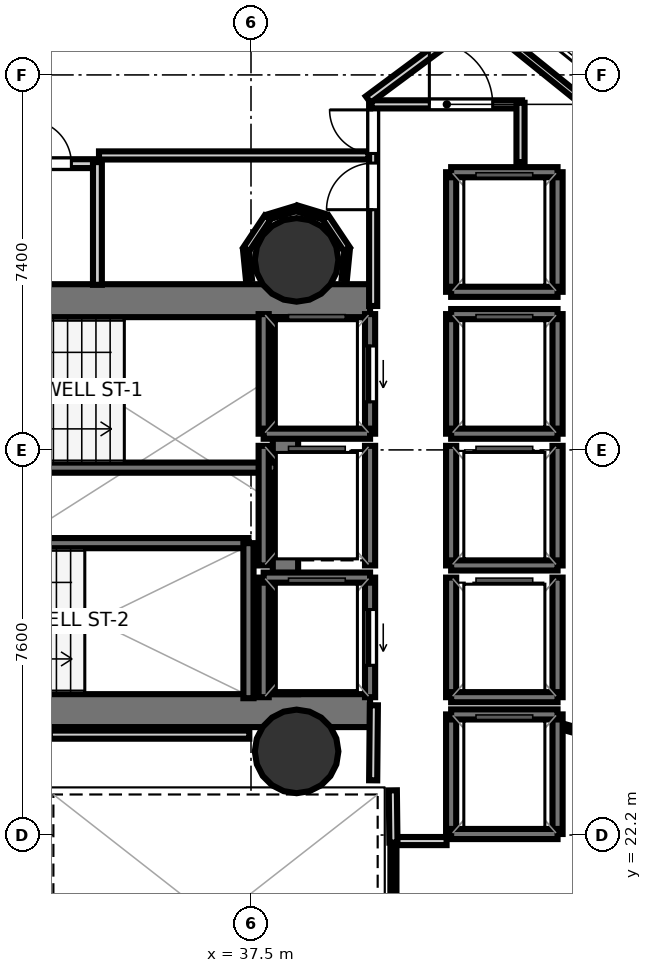
"""IFC4 building model, lengths in metres.
Left out: names, types, materials, properties, quantities, classifications, styles, units other than length and angle.
Written with IfcOpenShell. Run it as: python <this file> out.ifc"""

import sys

from ifc_helpers import new_model, si_unit, direction, frame, frame_2d, origin, origin_2d, place, context, subcontext, project, spatial, rectangle, hollow_circle, extrude, element, fill, save


model = new_model("IFC4")
c1 = context("Model", 3, precision=1e-05, world=origin(), true_north=direction((0.0, 1.0)))
c2 = subcontext(c1, "Body", "Model", "MODEL_VIEW")
j1 = project(units=[si_unit("LENGTHUNIT", "METRE"), si_unit("PLANEANGLEUNIT", "RADIAN")], contexts=[c1])
p1 = place(None, origin())
s1 = spatial("IfcSite", under=j1, at=p1, CompositionType="ELEMENT")
p2 = place(p1, origin())
s2 = spatial("IfcBuilding", under=s1, at=p2, CompositionType="ELEMENT")
p3 = place(p2, frame((0.0, 0.0, 82.1)))
s3 = spatial("IfcBuildingStorey", under=s2, at=p3, CompositionType="ELEMENT", Elevation=82.1)
p4 = place(p3, frame((29.13, 32.745, 0.0), z_axis=(0.0, 0.0, 1.0), x_axis=(1.0, 0.0, 0.0)))
e1 = element("IfcWall", 1, at=p4, inside=s3, PredefinedType="SHEAR", context=c2, shape_type="SweptSolid", body=[
    extrude(rectangle(XDim=10.72, YDim=0.65, at=frame_2d((5.36, 0.0))), origin(), (0.0, 0.0, 1.0), 3.52),
])
p5 = place(p4, frame((1.095, 0.0, 0.0)))
e2 = element("IfcOpeningElement", 2, at=p5, cuts=e1, PredefinedType="OPENING", context=c2, shape_type="SweptSolid", body=[
    extrude(rectangle(XDim=1.25, YDim=2.15, at=frame_2d((0.625, 1.075))), frame((0.0, 0.335, 0.0), z_axis=(0.0, -1.0, 0.0), x_axis=(1.0, 0.0, 0.0)), (0.0, 0.0, 1.0), 0.67),
])
p6 = place(p3, frame((29.13, 24.655, 0.0), z_axis=(0.0, 0.0, 1.0), x_axis=(1.0, 0.0, 0.0)))
e3 = element("IfcWall", 3, at=p6, inside=s3, PredefinedType="SHEAR", context=c2, shape_type="SweptSolid", body=[
    extrude(rectangle(XDim=10.72, YDim=0.65, at=frame_2d((5.36, 0.0))), origin(), (0.0, 0.0, 1.0), 3.52),
])
p7 = place(p6, frame((0.895, 0.0, 0.0)))
e4 = element("IfcOpeningElement", 4, at=p7, cuts=e3, PredefinedType="OPENING", context=c2, shape_type="SweptSolid", body=[
    extrude(rectangle(XDim=1.25, YDim=2.15, at=frame_2d((0.625, 1.075))), frame((0.0, 0.335, 0.0), z_axis=(0.0, -1.0, 0.0), x_axis=(1.0, 0.0, 0.0)), (0.0, 0.0, 1.0), 0.67),
])
p8 = place(p3, frame((38.18, 24.98, 0.0), z_axis=(0.0, 0.0, 1.0), x_axis=(0.0, 1.0, 0.0)))
e5 = element("IfcWall", 5, at=p8, inside=s3, PredefinedType="SHEAR", context=c2, shape_type="SweptSolid", body=[
    extrude(rectangle(XDim=7.44, YDim=0.5, at=frame_2d((3.72, 0.0))), origin(), (0.0, 0.0, 1.0), 3.52),
])
for number, where, z_axis, x_axis in (
    (6, (38.4, 33.55, 0.0), (0.0, 0.0, 1.0), (1.0, 0.0, 0.0)),
    (7, (38.4, 23.85, 0.0), (0.0, 0.0, 1.0), (1.0, 0.0, 0.0)),
):
    element("IfcColumn", number, at=place(p3, frame(where, z_axis=z_axis, x_axis=x_axis)), inside=s3, PredefinedType="COLUMN", context=c2, shape_type="SweptSolid", body=[
        extrude(hollow_circle(Radius=0.825, WallThickness=0.04, at=origin_2d()), origin(), (0.0, 0.0, 1.0), 3.7),
    ])
p9 = place(p3, frame((29.7, 29.45, 0.0), z_axis=(0.0, 0.0, 1.0), x_axis=(1.0, 0.0, 0.0)))
e8 = element("IfcWall", 8, at=p9, inside=s3, PredefinedType="SOLIDWALL", context=c2, shape_type="SweptSolid", body=[
    extrude(rectangle(XDim=8.3, YDim=0.2, at=frame_2d((4.15, 0.0))), origin(), (0.0, 0.0, 1.0), 3.52),
])
p10 = place(p3, frame((29.7, 27.96, 0.0), z_axis=(0.0, 0.0, 1.0), x_axis=(1.0, 0.0, 0.0)))
e9 = element("IfcWall", 9, at=p10, inside=s3, PredefinedType="SOLIDWALL", context=c2, shape_type="SweptSolid", body=[
    extrude(rectangle(XDim=7.75, YDim=0.2, at=frame_2d((3.875, 0.0))), origin(), (0.0, 0.0, 1.0), 3.52),
])
p11 = place(p3, frame((37.45, 24.9, 0.0), z_axis=(0.0, 0.0, 1.0), x_axis=(0.0, 1.0, 0.0)))
e10 = element("IfcWall", 10, at=p11, inside=s3, PredefinedType="SOLIDWALL", context=c2, shape_type="SweptSolid", body=[
    extrude(rectangle(XDim=3.06, YDim=0.2, at=frame_2d((1.53, 0.0))), origin(), (0.0, 0.0, 1.0), 3.52),
])
p12 = place(p3, frame((39.85, 30.12, 0.0), z_axis=(0.0, 0.0, 1.0), x_axis=(0.0, 1.0, 0.0)))
e11 = element("IfcWall", 11, at=p12, inside=s3, PredefinedType="SOLIDWALL", context=c2, shape_type="SweptSolid", body=[
    extrude(rectangle(XDim=2.36, YDim=0.2, at=frame_2d((1.18, 0.0))), origin(), (0.0, 0.0, 1.0), 3.52),
])
p13 = place(p12, frame((0.63, 0.0, 0.0)))
e12 = element("IfcOpeningElement", 12, at=p13, cuts=e11, PredefinedType="OPENING", context=c2, shape_type="SweptSolid", body=[
    extrude(rectangle(XDim=1.1, YDim=2.15, at=frame_2d((0.55, 1.075))), frame((0.0, 0.11, 0.0), z_axis=(0.0, -1.0, 0.0), x_axis=(1.0, 0.0, 0.0)), (0.0, 0.0, 1.0), 0.22),
])
p14 = place(p3, frame((37.75, 30.12, 0.0), z_axis=(0.0, 0.0, 1.0), x_axis=(0.0, 1.0, 0.0)))
e13 = element("IfcWall", 13, at=p14, inside=s3, PredefinedType="SOLIDWALL", context=c2, shape_type="SweptSolid", body=[
    extrude(rectangle(XDim=2.36, YDim=0.2, at=frame_2d((1.18, 0.0))), origin(), (0.0, 0.0, 1.0), 3.52),
])
p15 = place(p3, frame((37.75, 30.12, 0.0), z_axis=(0.0, 0.0, 1.0), x_axis=(1.0, 0.0, 0.0)))
e14 = element("IfcWall", 14, at=p15, inside=s3, PredefinedType="SOLIDWALL", context=c2, shape_type="SweptSolid", body=[
    extrude(rectangle(XDim=2.1, YDim=0.2, at=frame_2d((1.05, 0.0))), origin(), (0.0, 0.0, 1.0), 3.52),
])
p16 = place(p3, frame((39.85, 24.92, 0.0), z_axis=(0.0, 0.0, 1.0), x_axis=(0.0, 1.0, 0.0)))
e15 = element("IfcWall", 15, at=p16, inside=s3, PredefinedType="SOLIDWALL", context=c2, shape_type="SweptSolid", body=[
    extrude(rectangle(XDim=2.36, YDim=0.2, at=frame_2d((1.18, 0.0))), origin(), (0.0, 0.0, 1.0), 3.52),
])
p17 = place(p16, frame((0.63, 0.0, 0.0)))
e16 = element("IfcOpeningElement", 16, at=p17, cuts=e15, PredefinedType="OPENING", context=c2, shape_type="SweptSolid", body=[
    extrude(rectangle(XDim=1.1, YDim=2.15, at=frame_2d((0.55, 1.075))), frame((0.0, 0.11, 0.0), z_axis=(0.0, -1.0, 0.0), x_axis=(1.0, 0.0, 0.0)), (0.0, 0.0, 1.0), 0.22),
])
p18 = place(p3, frame((37.75, 24.92, 0.0), z_axis=(0.0, 0.0, 1.0), x_axis=(0.0, 1.0, 0.0)))
e17 = element("IfcWall", 17, at=p18, inside=s3, PredefinedType="SOLIDWALL", context=c2, shape_type="SweptSolid", body=[
    extrude(rectangle(XDim=2.36, YDim=0.2, at=frame_2d((1.18, 0.0))), origin(), (0.0, 0.0, 1.0), 3.52),
])
p19 = place(p3, frame((37.75, 27.28, 0.0), z_axis=(0.0, 0.0, 1.0), x_axis=(1.0, 0.0, 0.0)))
e18 = element("IfcWall", 18, at=p19, inside=s3, PredefinedType="SOLIDWALL", context=c2, shape_type="SweptSolid", body=[
    extrude(rectangle(XDim=2.1, YDim=0.2, at=frame_2d((1.05, 0.0))), origin(), (0.0, 0.0, 1.0), 3.52),
])
for number, where, z_axis, x_axis in (
    (19, (43.55, 30.12, 0.0), (0.0, 0.0, 1.0), (0.0, 1.0, 0.0)),
    (20, (41.45, 30.12, 0.0), (0.0, 0.0, 1.0), (0.0, 1.0, 0.0)),
):
    element("IfcWall", number, at=place(p3, frame(where, z_axis=z_axis, x_axis=x_axis)), inside=s3, PredefinedType="SOLIDWALL", context=c2, shape_type="SweptSolid", body=[
        extrude(rectangle(XDim=2.36, YDim=0.2, at=frame_2d((1.18, 0.0))), origin(), (0.0, 0.0, 1.0), 3.52),
    ])
for number, where, z_axis, x_axis in (
    (21, (41.45, 32.48, 0.0), (0.0, 0.0, 1.0), (1.0, 0.0, 0.0)),
    (22, (41.45, 30.12, 0.0), (0.0, 0.0, 1.0), (1.0, 0.0, 0.0)),
):
    element("IfcWall", number, at=place(p3, frame(where, z_axis=z_axis, x_axis=x_axis)), inside=s3, PredefinedType="SOLIDWALL", context=c2, shape_type="SweptSolid", body=[
        extrude(rectangle(XDim=2.1, YDim=0.2, at=frame_2d((1.05, 0.0))), origin(), (0.0, 0.0, 1.0), 3.52),
    ])
for number, where, z_axis, x_axis in (
    (23, (43.55, 27.52, 0.0), (0.0, 0.0, 1.0), (0.0, 1.0, 0.0)),
    (24, (41.45, 27.52, 0.0), (0.0, 0.0, 1.0), (0.0, 1.0, 0.0)),
):
    element("IfcWall", number, at=place(p3, frame(where, z_axis=z_axis, x_axis=x_axis)), inside=s3, PredefinedType="SOLIDWALL", context=c2, shape_type="SweptSolid", body=[
        extrude(rectangle(XDim=2.36, YDim=0.2, at=frame_2d((1.18, 0.0))), origin(), (0.0, 0.0, 1.0), 3.52),
    ])
p20 = place(p3, frame((41.45, 27.52, 0.0), z_axis=(0.0, 0.0, 1.0), x_axis=(1.0, 0.0, 0.0)))
e25 = element("IfcWall", 25, at=p20, inside=s3, PredefinedType="SOLIDWALL", context=c2, shape_type="SweptSolid", body=[
    extrude(rectangle(XDim=2.1, YDim=0.2, at=frame_2d((1.05, 0.0))), origin(), (0.0, 0.0, 1.0), 3.52),
])
for number, where, z_axis, x_axis in (
    (26, (43.55, 24.92, 0.0), (0.0, 0.0, 1.0), (0.0, 1.0, 0.0)),
    (27, (41.45, 24.92, 0.0), (0.0, 0.0, 1.0), (0.0, 1.0, 0.0)),
):
    element("IfcWall", number, at=place(p3, frame(where, z_axis=z_axis, x_axis=x_axis)), inside=s3, PredefinedType="SOLIDWALL", context=c2, shape_type="SweptSolid", body=[
        extrude(rectangle(XDim=2.36, YDim=0.2, at=frame_2d((1.18, 0.0))), origin(), (0.0, 0.0, 1.0), 3.52),
    ])
p21 = place(p3, frame((41.45, 24.92, 0.0), z_axis=(0.0, 0.0, 1.0), x_axis=(1.0, 0.0, 0.0)))
e28 = element("IfcWall", 28, at=p21, inside=s3, PredefinedType="SOLIDWALL", context=c2, shape_type="SweptSolid", body=[
    extrude(rectangle(XDim=2.1, YDim=0.2, at=frame_2d((1.05, 0.0))), origin(), (0.0, 0.0, 1.0), 3.52),
])
for number, where, z_axis, x_axis in (
    (29, (39.85, 27.52, 0.0), (0.0, 0.0, 1.0), (0.0, 1.0, 0.0)),
    (30, (37.75, 27.52, 0.0), (0.0, 0.0, 1.0), (0.0, 1.0, 0.0)),
):
    element("IfcWall", number, at=place(p3, frame(where, z_axis=z_axis, x_axis=x_axis)), inside=s3, PredefinedType="SOLIDWALL", context=c2, shape_type="SweptSolid", body=[
        extrude(rectangle(XDim=2.36, YDim=0.2, at=frame_2d((1.18, 0.0))), origin(), (0.0, 0.0, 1.0), 3.52),
    ])
for number, where, z_axis, x_axis in (
    (31, (43.55, 22.22, 0.0), (0.0, 0.0, 1.0), (0.0, 1.0, 0.0)),
    (32, (41.45, 22.22, 0.0), (0.0, 0.0, 1.0), (0.0, 1.0, 0.0)),
):
    element("IfcWall", number, at=place(p3, frame(where, z_axis=z_axis, x_axis=x_axis)), inside=s3, PredefinedType="SOLIDWALL", context=c2, shape_type="SweptSolid", body=[
        extrude(rectangle(XDim=2.36, YDim=0.2, at=frame_2d((1.18, 0.0))), origin(), (0.0, 0.0, 1.0), 3.52),
    ])
for number, where, z_axis, x_axis in (
    (33, (41.45, 24.58, 0.0), (0.0, 0.0, 1.0), (1.0, 0.0, 0.0)),
    (34, (41.45, 22.22, 0.0), (0.0, 0.0, 1.0), (1.0, 0.0, 0.0)),
):
    element("IfcWall", number, at=place(p3, frame(where, z_axis=z_axis, x_axis=x_axis)), inside=s3, PredefinedType="SOLIDWALL", context=c2, shape_type="SweptSolid", body=[
        extrude(rectangle(XDim=2.1, YDim=0.2, at=frame_2d((1.05, 0.0))), origin(), (0.0, 0.0, 1.0), 3.52),
    ])
for number, where, z_axis, x_axis in (
    (35, (43.55, 32.92, 0.0), (0.0, 0.0, 1.0), (0.0, 1.0, 0.0)),
    (36, (41.45, 32.92, 0.0), (0.0, 0.0, 1.0), (0.0, 1.0, 0.0)),
):
    element("IfcWall", number, at=place(p3, frame(where, z_axis=z_axis, x_axis=x_axis)), inside=s3, PredefinedType="SOLIDWALL", context=c2, shape_type="SweptSolid", body=[
        extrude(rectangle(XDim=2.36, YDim=0.2, at=frame_2d((1.18, 0.0))), origin(), (0.0, 0.0, 1.0), 3.52),
    ])
for number, where, z_axis, x_axis in (
    (37, (41.45, 35.28, 0.0), (0.0, 0.0, 1.0), (1.0, 0.0, 0.0)),
    (38, (41.45, 32.92, 0.0), (0.0, 0.0, 1.0), (1.0, 0.0, 0.0)),
):
    element("IfcWall", number, at=place(p3, frame(where, z_axis=z_axis, x_axis=x_axis)), inside=s3, PredefinedType="SOLIDWALL", context=c2, shape_type="SweptSolid", body=[
        extrude(rectangle(XDim=2.1, YDim=0.2, at=frame_2d((1.05, 0.0))), origin(), (0.0, 0.0, 1.0), 3.52),
    ])
p22 = place(p3, frame((39.911, 32.64, 0.0), z_axis=(0.0, 0.0, 1.0), x_axis=(0.0, 1.0, 0.0)))
e39 = element("IfcWall", 39, at=p22, inside=s3, PredefinedType="PARTITIONING", context=c2, shape_type="SweptSolid", body=[
    extrude(rectangle(XDim=4.01, YDim=0.16, at=frame_2d((2.005, 0.0))), origin(), (0.0, 0.0, 1.0), 2.84),
])
p23 = place(p22, frame((3.01, 0.0, 0.0)))
e40 = element("IfcOpeningElement", 40, at=p23, cuts=e39, PredefinedType="OPENING", context=c2, shape_type="SweptSolid", body=[
    extrude(rectangle(XDim=0.86, YDim=2.05, at=frame_2d((0.43, 1.025))), frame((0.0, 0.09, 0.0), z_axis=(0.0, -1.0, 0.0), x_axis=(1.0, 0.0, 0.0)), (0.0, 0.0, 1.0), 0.18),
])
p24 = place(p22, frame((1.9, 0.0, 0.0)))
e41 = element("IfcOpeningElement", 41, at=p24, cuts=e39, PredefinedType="OPENING", context=c2, shape_type="SweptSolid", body=[
    extrude(rectangle(XDim=0.92, YDim=2.1, at=frame_2d((0.46, 1.05))), frame((0.0, 0.09, 0.0), z_axis=(0.0, -1.0, 0.0), x_axis=(1.0, 0.0, 0.0)), (0.0, 0.0, 1.0), 0.18),
])
p25 = place(p3, frame((39.88, 36.619, 0.0), z_axis=(0.0, 0.0, 1.0), x_axis=(1.0, 0.0, 0.0)))
e42 = element("IfcWall", 42, at=p25, inside=s3, PredefinedType="PARTITIONING", context=c2, shape_type="SweptSolid", body=[
    extrude(rectangle(XDim=2.97, YDim=0.16, at=frame_2d((1.485, 0.0))), origin(), (0.0, 0.0, 1.0), 2.798),
])
p26 = place(p25, frame((1.14, 0.0, 0.0)))
e43 = element("IfcOpeningElement", 43, at=p26, cuts=e42, PredefinedType="OPENING", context=c2, shape_type="SweptSolid", body=[
    extrude(rectangle(XDim=1.25, YDim=2.2, at=frame_2d((0.625, 1.1))), frame((0.0, 0.09, 0.0), z_axis=(0.0, -1.0, 0.0), x_axis=(1.0, 0.0, 0.0)), (0.0, 0.0, 1.0), 0.18),
])
p27 = place(p3, frame((42.819, 36.65, 0.0), z_axis=(0.0, 0.0, 1.0), x_axis=(0.0, -1.0, 0.0)))
e44 = element("IfcWall", 44, at=p27, inside=s3, PredefinedType="PARTITIONING", context=c2, shape_type="SweptSolid", body=[
    extrude(rectangle(XDim=1.17, YDim=0.16, at=frame_2d((0.585, 0.0))), origin(), (0.0, 0.0, 1.0), 2.798),
])
p28 = place(p3, frame((41.36, 22.081, 0.0), z_axis=(0.0, 0.0, 1.0), x_axis=(-1.0, 0.0, 0.0)))
e45 = element("IfcWall", 45, at=p28, inside=s3, PredefinedType="PARTITIONING", context=c2, shape_type="SweptSolid", body=[
    extrude(rectangle(XDim=1.08, YDim=0.16, at=frame_2d((0.54, 0.0))), origin(), (0.0, 0.0, 1.0), 2.84),
])
p29 = place(p3, frame((40.311, 22.05, 0.0), z_axis=(0.0, 0.0, 1.0), x_axis=(-0.011836292006, 0.999929948642, 0.0)))
e46 = element("IfcWall", 46, at=p29, inside=s3, PredefinedType="PARTITIONING", context=c2, shape_type="SweptSolid", body=[
    extrude(rectangle(XDim=1.031, YDim=0.16, at=frame_2d((0.516, 0.0))), origin(), (0.0, 0.0, 1.0), 2.84),
])
p30 = place(p3, frame((39.911, 23.28, 0.0), z_axis=(0.0, 0.0, 1.0), x_axis=(0.009397771291, 0.999955839972, 0.0)))
e47 = element("IfcWall", 47, at=p30, inside=s3, PredefinedType="PARTITIONING", context=c2, shape_type="SweptSolid", body=[
    extrude(rectangle(XDim=1.481, YDim=0.16, at=frame_2d((0.74, 0.0))), origin(), (0.0, 0.0, 1.0), 2.84),
])
p31 = place(p3, frame((32.55, 35.449, 0.0), z_axis=(0.0, 0.0, 1.0), x_axis=(1.0, 0.0, 0.0)))
e48 = element("IfcWall", 48, at=p31, inside=s3, PredefinedType="PLUMBINGWALL", context=c2, shape_type="SweptSolid", body=[
    extrude(rectangle(XDim=1.95, YDim=0.175, at=frame_2d((0.975, 0.0))), origin(), (0.0, 0.0, 1.0), 2.84),
])
p32 = place(p31, frame((0.545, 0.0, 0.0)))
e49 = element("IfcOpeningElement", 49, at=p32, cuts=e48, PredefinedType="OPENING", context=c2, shape_type="SweptSolid", body=[
    extrude(rectangle(XDim=0.86, YDim=2.05, at=frame_2d((0.43, 1.025))), frame((0.0, 0.097, 0.0), z_axis=(0.0, -1.0, 0.0), x_axis=(1.0, 0.0, 0.0)), (0.0, 0.0, 1.0), 0.195),
])
p33 = place(p3, frame((34.469, 35.48, 0.0), z_axis=(0.0, 0.0, 1.0), x_axis=(0.0, -1.0, 0.0)))
e50 = element("IfcWall", 50, at=p33, inside=s3, PredefinedType="PLUMBINGWALL", context=c2, shape_type="SweptSolid", body=[
    extrude(rectangle(XDim=2.422, YDim=0.175, at=frame_2d((1.211, 0.0))), origin(), (0.0, 0.0, 1.0), 2.84),
])
p34 = place(p3, frame((37.467, 24.181, 0.0), z_axis=(0.0, 0.0, 1.0), x_axis=(-1.0, 0.0, 0.0)))
e51 = element("IfcWall", 51, at=p34, inside=s3, PredefinedType="PARTITIONING", context=c2, shape_type="SweptSolid", body=[
    extrude(rectangle(XDim=3.937, YDim=0.16, at=frame_2d((1.968, 0.0))), origin(), (0.0, 0.0, 1.0), 2.84),
])
p35 = place(p3, frame((42.49, 38.702, 0.0), z_axis=(0.0, 0.0, 1.0), x_axis=(-0.802811948591, -0.596232316467, 0.0)))
e52 = element("IfcWall", 52, at=p35, inside=s3, PredefinedType="PARTITIONING", context=c2, shape_type="SweptSolid", body=[
    extrude(rectangle(XDim=3.334, YDim=0.16, at=frame_2d((1.667, 0.0))), origin(), (0.0, 0.0, 1.0), 2.798),
])
p36 = place(p3, frame((39.818, 35.611, 0.0), z_axis=(0.0, 0.0, 1.0), x_axis=(-1.0, 0.0, 0.0)))
e53 = element("IfcWall", 53, at=p36, inside=s3, PredefinedType="PARTITIONING", context=c2, shape_type="SweptSolid", body=[
    extrude(rectangle(XDim=5.318, YDim=0.16, at=frame_2d((2.659, 0.0))), origin(), (0.0, 0.0, 1.0), 2.84),
])
p37 = place(p3, frame((40.31, 17.972, 0.0), z_axis=(0.0, 0.0, 1.0), x_axis=(0.000305362145, 0.999999953377, 0.0)))
e54 = element("IfcWall", 54, at=p37, inside=s3, PredefinedType="PARTITIONING", context=c2, shape_type="SweptSolid", body=[
    extrude(rectangle(XDim=3.998, YDim=0.12, at=frame_2d((1.999, 0.0))), origin(), (0.0, 0.0, 1.0), 2.84),
])
p38 = place(p3, frame((43.711, 24.323, 0.0), z_axis=(0.0, 0.0, 1.0), x_axis=(0.961349794869, -0.275329932819, 0.0)))
e55 = element("IfcWall", 55, at=p38, inside=s3, PredefinedType="PARTITIONING", context=c2, shape_type="SweptSolid", body=[
    extrude(rectangle(XDim=4.819, YDim=0.12, at=frame_2d((2.41, 0.0))), origin(), (0.0, 0.0, 1.0), 2.84),
])
p39 = place(p3, frame((42.09, 38.26, 0.0), z_axis=(0.0, 0.0, 1.0), x_axis=(0.778096949257, -0.628144201244, 0.0)))
e56 = element("IfcWall", 56, at=p39, inside=s3, PredefinedType="PARTITIONING", context=c2, shape_type="SweptSolid", body=[
    extrude(rectangle(XDim=8.014, YDim=0.14, at=frame_2d((4.007, 0.0))), origin(), (0.0, 0.0, 1.0), 2.798),
])
p40 = place(p3, frame((39.341, 33.17, 0.0), z_axis=(0.0, 0.0, 1.0), x_axis=(0.098193262045, 0.995167364461, 0.0)))
e57 = element("IfcWall", 57, at=p40, inside=s3, PredefinedType="PARTITIONING", context=c2, shape_type="SweptSolid", body=[
    extrude(rectangle(XDim=0.572, YDim=0.105, at=frame_2d((0.286, 0.0))), origin(), (0.0, 0.0, 1.0), 2.84),
])
p41 = place(p3, frame((39.392, 33.76, 0.0), z_axis=(0.0, 0.0, 1.0), x_axis=(-0.555746078923, 0.831352088926, 0.0)))
e58 = element("IfcWall", 58, at=p41, inside=s3, PredefinedType="PARTITIONING", context=c2, shape_type="SweptSolid", body=[
    extrude(rectangle(XDim=0.754, YDim=0.14, at=frame_2d((0.377, 0.0))), origin(), (0.0, 0.0, 1.0), 2.84),
])
p42 = place(p3, frame((38.956, 34.399, 0.0), z_axis=(0.0, 0.0, 1.0), x_axis=(-0.956952578659, 0.290244314669, 0.0)))
e59 = element("IfcWall", 59, at=p42, inside=s3, PredefinedType="PARTITIONING", context=c2, shape_type="SweptSolid", body=[
    extrude(rectangle(XDim=0.572, YDim=0.12, at=frame_2d((0.286, 0.0))), origin(), (0.0, 0.0, 1.0), 2.84),
])
p43 = place(p3, frame((38.391, 34.565, 0.0), z_axis=(0.0, 0.0, 1.0), x_axis=(-0.956952578659, -0.290244314669, 0.0)))
e60 = element("IfcWall", 60, at=p43, inside=s3, PredefinedType="PARTITIONING", context=c2, shape_type="SweptSolid", body=[
    extrude(rectangle(XDim=0.572, YDim=0.105, at=frame_2d((0.286, 0.0))), origin(), (0.0, 0.0, 1.0), 2.84),
])
p44 = place(p3, frame((37.827, 34.386, 0.0), z_axis=(0.0, 0.0, 1.0), x_axis=(-0.555522182913, -0.831501716349, 0.0)))
e61 = element("IfcWall", 61, at=p44, inside=s3, PredefinedType="PARTITIONING", context=c2, shape_type="SweptSolid", body=[
    extrude(rectangle(XDim=0.754, YDim=0.14, at=frame_2d((0.377, 0.0))), origin(), (0.0, 0.0, 1.0), 2.84),
])
p45 = place(p3, frame((37.403, 33.739, 0.0), z_axis=(0.0, 0.0, 1.0), x_axis=(0.097770424665, -0.995208995167, 0.0)))
e62 = element("IfcWall", 62, at=p45, inside=s3, PredefinedType="PARTITIONING", context=c2, shape_type="SweptSolid", body=[
    extrude(rectangle(XDim=0.572, YDim=0.12, at=frame_2d((0.286, 0.0))), origin(), (0.0, 0.0, 1.0), 2.84),
])
p46 = place(p13, origin())
e63 = element("IfcDoor", 63, at=p46, inside=s3, OperationType="SLIDING_TO_LEFT", PredefinedType="DOOR", context=c2, shape_type="SweptSolid", body=[
    extrude(rectangle(XDim=1.1, YDim=2.15, at=frame_2d((0.55, 1.075))), frame((0.0, 0.025, 0.0), z_axis=(0.0, -1.0, 0.0), x_axis=(1.0, 0.0, 0.0)), (0.0, 0.0, 1.0), 0.05),
])
fill(e12, e63)
p47 = place(p17, origin())
e64 = element("IfcDoor", 64, at=p47, inside=s3, OperationType="SLIDING_TO_LEFT", PredefinedType="DOOR", context=c2, shape_type="SweptSolid", body=[
    extrude(rectangle(XDim=1.1, YDim=2.15, at=frame_2d((0.55, 1.075))), frame((0.0, 0.025, 0.0), z_axis=(0.0, -1.0, 0.0), x_axis=(1.0, 0.0, 0.0)), (0.0, 0.0, 1.0), 0.05),
])
fill(e16, e64)
p48 = place(p23, origin())
e65 = element("IfcDoor", 65, at=p48, inside=s3, OperationType="SINGLE_SWING_RIGHT", PredefinedType="DOOR", context=c2, shape_type="SweptSolid", body=[
    extrude(rectangle(XDim=0.86, YDim=2.05, at=frame_2d((0.43, 1.025))), frame((0.0, 0.025, 0.0), z_axis=(0.0, -1.0, 0.0), x_axis=(1.0, 0.0, 0.0)), (0.0, 0.0, 1.0), 0.05),
])
fill(e40, e65)
p49 = place(p32, origin())
e66 = element("IfcDoor", 66, at=p49, inside=s3, OperationType="SINGLE_SWING_LEFT", PredefinedType="DOOR", context=c2, shape_type="SweptSolid", body=[
    extrude(rectangle(XDim=0.86, YDim=2.05, at=frame_2d((0.43, 1.025))), frame((0.0, 0.025, 0.0), z_axis=(0.0, -1.0, 0.0), x_axis=(1.0, 0.0, 0.0)), (0.0, 0.0, 1.0), 0.05),
])
fill(e49, e66)
p50 = place(p26, origin())
e67 = element("IfcDoor", 67, at=p50, inside=s3, OperationType="SINGLE_SWING_LEFT", PredefinedType="DOOR", context=c2, shape_type="SweptSolid", body=[
    extrude(rectangle(XDim=1.25, YDim=2.2, at=frame_2d((0.625, 1.1))), frame((0.0, 0.025, 0.0), z_axis=(0.0, -1.0, 0.0), x_axis=(1.0, 0.0, 0.0)), (0.0, 0.0, 1.0), 0.05),
])
fill(e43, e67)
p51 = place(p24, origin())
e68 = element("IfcDoor", 68, at=p51, inside=s3, OperationType="SINGLE_SWING_LEFT", PredefinedType="DOOR", context=c2, shape_type="SweptSolid", body=[
    extrude(rectangle(XDim=0.92, YDim=2.1, at=frame_2d((0.46, 1.05))), frame((0.0, 0.025, 0.0), z_axis=(0.0, -1.0, 0.0), x_axis=(1.0, 0.0, 0.0)), (0.0, 0.0, 1.0), 0.05),
])
fill(e41, e68)
save(model, sys.argv[1])
